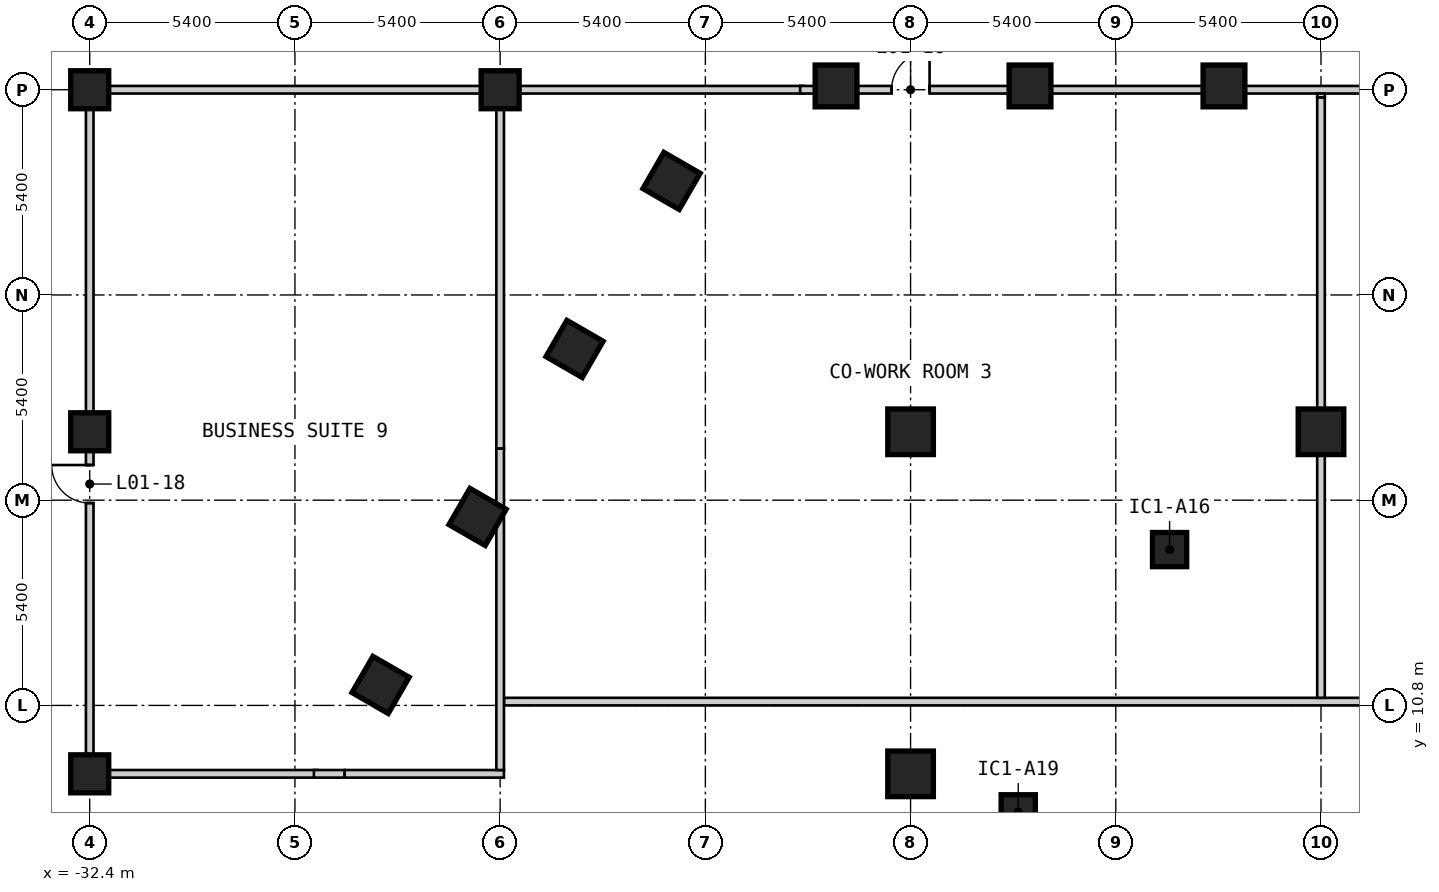
"""IFC4 building model, lengths in metres.
Left out: names, types, materials, properties, quantities, classifications, styles, units other than length and angle.
Written with IfcOpenShell. Run it as: python <this file> out.ifc"""

import sys

from ifc_helpers import new_model, si_unit, direction, frame, frame_2d, origin, origin_2d, place, context, subcontext, project, spatial, rectangle, extrude, element, fill, save


model = new_model("IFC4")
c1 = context("Model", 3, precision=1e-05, world=origin(), true_north=direction((0.0, 1.0)))
c2 = subcontext(c1, "Body", "Model", "MODEL_VIEW")
j1 = project(units=[si_unit("LENGTHUNIT", "METRE"), si_unit("PLANEANGLEUNIT", "RADIAN")], contexts=[c1])
p1 = place(None, origin())
s1 = spatial("IfcSite", under=j1, at=p1, CompositionType="ELEMENT")
p2 = place(p1, origin())
s2 = spatial("IfcBuilding", under=s1, at=p2, CompositionType="ELEMENT")
p3 = place(p2, frame((0.0, 0.0, 5.0)))
s3 = spatial("IfcBuildingStorey", under=s2, at=p3, CompositionType="ELEMENT", Elevation=5.0)
for number, where, z_axis, x_axis in (
    (1, (-2.553, 27.1, 0.0), (0.0, 0.0, 1.0), (-1.0, 0.0, 0.0)),
    (2, (-7.657, 27.1, 0.0), (0.0, 0.0, 1.0), (-1.0, 0.0, 0.0)),
    (3, (-12.761, 27.1, 0.0), (0.0, 0.0, 1.0), (-1.0, 0.0, 0.0)),
    (4, (-17.09, 24.6, 0.0), (0.0, 0.0, 1.0), (-0.5, -0.866, 0.0)),
    (5, (-19.642, 20.18, 0.0), (0.0, 0.0, 1.0), (-0.5, -0.866, 0.0)),
    (6, (-22.194, 15.759, 0.0), (0.0, 0.0, 1.0), (-0.5, -0.866, 0.0)),
    (7, (-24.746, 11.339, 0.0), (0.0, 0.0, 1.0), (-0.5, -0.866, 0.0)),
):
    element("IfcColumn", number, at=place(p3, frame(where, z_axis=z_axis, x_axis=x_axis)), inside=s3, PredefinedType="COLUMN", context=c2, shape_type="SweptSolid", body=[
        extrude(rectangle(XDim=1.1, YDim=1.1, at=origin_2d()), origin(), (0.0, 0.0, 1.0), 4.0),
    ])
for number, where, z_axis, x_axis in (
    (8, (-3.984, 14.9, 0.0), (0.0, 0.0, 1.0), (1.0, 0.0, 0.0)),
    (9, (-7.967, 8.0, 0.0), (0.0, 0.0, 1.0), (1.0, 0.0, 0.0)),
):
    element("IfcColumn", number, at=place(p3, frame(where, z_axis=z_axis, x_axis=x_axis)), inside=s3, PredefinedType="COLUMN", context=c2, shape_type="SweptSolid", body=[
        extrude(rectangle(XDim=0.9, YDim=0.9, at=origin_2d()), origin(), (0.0, 0.0, 1.0), 4.0),
    ])
for number, where, z_axis, x_axis in (
    (10, (-10.8, 9.0, 0.0), (0.0, 0.0, 1.0), (1.0, 0.0, 0.0)),
    (11, (-10.8, 18.0, 0.0), (0.0, 0.0, 1.0), (1.0, 0.0, 0.0)),
    (12, (0.0, 18.0, 0.0), (0.0, 0.0, 1.0), (1.0, 0.0, 0.0)),
):
    element("IfcColumn", number, at=place(p3, frame(where, z_axis=z_axis, x_axis=x_axis)), inside=s3, PredefinedType="COLUMN", context=c2, shape_type="SweptSolid", body=[
        extrude(rectangle(XDim=1.2, YDim=1.2, at=origin_2d()), origin(), (0.0, 0.0, 1.0), 4.0),
    ])
for number, where, z_axis, x_axis in (
    (13, (-32.4, 9.0, 0.0), (0.0, 0.0, 1.0), (1.0, 0.0, 0.0)),
    (14, (-32.4, 18.0, 0.0), (0.0, 0.0, 1.0), (1.0, 0.0, 0.0)),
    (15, (-32.4, 27.0, 0.0), (0.0, 0.0, 1.0), (1.0, 0.0, 0.0)),
    (16, (-21.6, 27.0, 0.0), (0.0, 0.0, 1.0), (1.0, 0.0, 0.0)),
):
    element("IfcColumn", number, at=place(p3, frame(where, z_axis=z_axis, x_axis=x_axis)), inside=s3, PredefinedType="COLUMN", context=c2, shape_type="SweptSolid", body=[
        extrude(rectangle(XDim=1.0, YDim=1.0, at=origin_2d()), origin(), (0.0, 0.0, 1.0), 4.0),
    ])
p4 = place(p3, frame((-32.4, 9.0, 0.0), z_axis=(0.0, 0.0, 1.0), x_axis=(1.0, 0.0, 0.0)))
e17 = element("IfcWall", 17, at=p4, inside=s3, PredefinedType="PARTITIONING", context=c2, shape_type="SweptSolid", body=[
    extrude(rectangle(XDim=5.999, YDim=0.2, at=frame_2d((3.0, 0.0))), origin(), (0.0, 0.0, 1.0), 3.5),
])
p5 = place(p3, frame((-26.501, 9.0, 0.0), z_axis=(0.0, 0.0, 1.0), x_axis=(1.0, 0.0, 0.0)))
e18 = element("IfcWall", 18, at=p5, inside=s3, PredefinedType="PARTITIONING", context=c2, shape_type="SweptSolid", body=[
    extrude(rectangle(XDim=0.809, YDim=0.2, at=frame_2d((0.405, 0.0))), origin(), (0.0, 0.0, 1.0), 2.77),
])
p6 = place(p3, frame((-25.692, 9.0, 0.0), z_axis=(0.0, 0.0, 1.0), x_axis=(1.0, 0.0, 0.0)))
e19 = element("IfcWall", 19, at=p6, inside=s3, PredefinedType="PARTITIONING", context=c2, shape_type="SweptSolid", body=[
    extrude(rectangle(XDim=4.192, YDim=0.2, at=frame_2d((2.096, 0.0))), origin(), (0.0, 0.0, 1.0), 3.5),
])
p7 = place(p3, frame((-21.5, 10.9, 0.0), z_axis=(0.0, 0.0, 1.0), x_axis=(1.0, 0.0, 0.0)))
e20 = element("IfcWall", 20, at=p7, inside=s3, PredefinedType="PARTITIONING", context=c2, shape_type="SweptSolid", body=[
    extrude(rectangle(XDim=43.0, YDim=0.2, at=frame_2d((21.5, 0.0))), origin(), (0.0, 0.0, 1.0), 3.5),
])
p8 = place(p3, frame((-32.4, 27.0, 0.0), z_axis=(0.0, 0.0, 1.0), x_axis=(1.0, 0.0, 0.0)))
e21 = element("IfcWall", 21, at=p8, inside=s3, PredefinedType="PARTITIONING", context=c2, shape_type="SweptSolid", body=[
    extrude(rectangle(XDim=18.793, YDim=0.2, at=frame_2d((9.396, 0.0))), origin(), (0.0, 0.0, 1.0), 3.5),
])
p9 = place(p3, frame((-13.707, 27.0, 0.0), z_axis=(0.0, 0.0, 1.0), x_axis=(1.0, 0.0, 0.0)))
e22 = element("IfcWall", 22, at=p9, inside=s3, PredefinedType="PARTITIONING", context=c2, shape_type="SweptSolid", body=[
    extrude(rectangle(XDim=0.946, YDim=0.2, at=frame_2d((0.473, 0.0))), origin(), (0.0, 0.0, 1.0), 2.77),
])
p10 = place(p3, frame((-12.761, 27.0, 0.0), z_axis=(0.0, 0.0, 1.0), x_axis=(1.0, 0.0, 0.0)))
e23 = element("IfcWall", 23, at=p10, inside=s3, PredefinedType="PARTITIONING", context=c2, shape_type="SweptSolid", body=[
    extrude(rectangle(XDim=0.116, YDim=0.2, at=frame_2d((0.058, 0.0))), origin(), (0.0, 0.0, 1.0), 2.77),
])
p11 = place(p3, frame((-12.645, 27.0, 0.0), z_axis=(0.0, 0.0, 1.0), x_axis=(1.0, 0.0, 0.0)))
e24 = element("IfcWall", 24, at=p11, inside=s3, PredefinedType="PARTITIONING", context=c2, shape_type="SweptSolid", body=[
    extrude(rectangle(XDim=4.988, YDim=0.2, at=frame_2d((2.494, 0.0))), origin(), (0.0, 0.0, 1.0), 2.77),
])
p12 = place(p11, frame((2.345, 0.0, 0.0), z_axis=(0.0, 0.0, 1.0), x_axis=(-1.0, 0.0, 0.0)))
e25 = element("IfcOpeningElement", 25, at=p12, cuts=e24, PredefinedType="OPENING", context=c2, shape_type="SweptSolid", body=[
    extrude(rectangle(XDim=1.0, YDim=2.1, at=frame_2d((0.5, 1.05))), frame((0.0, 0.11, 0.0), z_axis=(0.0, -1.0, 0.0), x_axis=(1.0, 0.0, 0.0)), (0.0, 0.0, 1.0), 0.22),
])
for number, where, z_axis, x_axis in (
    (26, (-7.657, 27.0, 0.0), (0.0, 0.0, 1.0), (1.0, 0.0, 0.0)),
    (27, (-2.553, 27.0, 0.0), (0.0, 0.0, 1.0), (1.0, 0.0, 0.0)),
):
    element("IfcWall", number, at=place(p3, frame(where, z_axis=z_axis, x_axis=x_axis)), inside=s3, PredefinedType="PARTITIONING", context=c2, shape_type="SweptSolid", body=[
        extrude(rectangle(XDim=5.104, YDim=0.2, at=frame_2d((2.552, 0.0))), origin(), (0.0, 0.0, 1.0), 2.77),
    ])
p13 = place(p3, frame((-32.4, 9.1, 0.0), z_axis=(0.0, 0.0, 1.0), x_axis=(0.0, 1.0, 0.0)))
e28 = element("IfcWall", 28, at=p13, inside=s3, PredefinedType="PARTITIONING", context=c2, shape_type="SweptSolid", body=[
    extrude(rectangle(XDim=17.8, YDim=0.2, at=frame_2d((8.9, 0.0))), origin(), (0.0, 0.0, 1.0), 3.5),
])
p14 = place(p13, frame((8.025, 0.0, 0.0), z_axis=(0.0, 0.0, 1.0), x_axis=(-1.0, 0.0, 0.0)))
e29 = element("IfcOpeningElement", 29, at=p14, cuts=e28, PredefinedType="OPENING", context=c2, shape_type="SweptSolid", body=[
    extrude(rectangle(XDim=1.0, YDim=2.1, at=frame_2d((0.5, 1.05))), frame((0.0, 0.11, 0.0), z_axis=(0.0, -1.0, 0.0), x_axis=(1.0, 0.0, 0.0)), (0.0, 0.0, 1.0), 0.22),
])
p15 = place(p3, frame((-21.6, 9.1, 0.0), z_axis=(0.0, 0.0, 1.0), x_axis=(0.0, 1.0, 0.0)))
e30 = element("IfcWall", 30, at=p15, inside=s3, PredefinedType="PARTITIONING", context=c2, shape_type="SweptSolid", body=[
    extrude(rectangle(XDim=6.915, YDim=0.2, at=frame_2d((3.458, 0.0))), origin(), (0.0, 0.0, 1.0), 3.5),
])
p16 = place(p3, frame((-21.6, 16.015, 0.0), z_axis=(0.0, 0.0, 1.0), x_axis=(0.0, 1.0, 0.0)))
e31 = element("IfcWall", 31, at=p16, inside=s3, PredefinedType="PARTITIONING", context=c2, shape_type="SweptSolid", body=[
    extrude(rectangle(XDim=1.546, YDim=0.2, at=frame_2d((0.773, 0.0))), origin(), (0.0, 0.0, 1.0), 2.77),
])
p17 = place(p3, frame((-21.6, 17.561, 0.0), z_axis=(0.0, 0.0, 1.0), x_axis=(0.0, 1.0, 0.0)))
e32 = element("IfcWall", 32, at=p17, inside=s3, PredefinedType="PARTITIONING", context=c2, shape_type="SweptSolid", body=[
    extrude(rectangle(XDim=9.339, YDim=0.2, at=frame_2d((4.669, 0.0))), origin(), (0.0, 0.0, 1.0), 3.5),
])
p18 = place(p3, frame((0.0, 11.0, 0.0), z_axis=(0.0, 0.0, 1.0), x_axis=(0.0, 1.0, 0.0)))
e33 = element("IfcWall", 33, at=p18, inside=s3, PredefinedType="PARTITIONING", context=c2, shape_type="SweptSolid", body=[
    extrude(rectangle(XDim=15.8, YDim=0.2, at=frame_2d((7.9, 0.0))), origin(), (0.0, 0.0, 1.0), 3.5),
])
p19 = place(p3, frame((0.0, 26.8, 0.0), z_axis=(0.0, 0.0, 1.0), x_axis=(0.0, 1.0, 0.0)))
e34 = element("IfcWall", 34, at=p19, inside=s3, PredefinedType="PARTITIONING", context=c2, shape_type="SweptSolid", body=[
    extrude(rectangle(XDim=0.1, YDim=0.2, at=frame_2d((0.05, 0.0))), origin(), (0.0, 0.0, 1.0), 2.77),
])
p20 = place(p12, origin())
e35 = element("IfcDoor", 35, at=p20, inside=s3, OperationType="SINGLE_SWING_LEFT", PredefinedType="DOOR", context=c2, shape_type="SweptSolid", body=[
    extrude(rectangle(XDim=1.0, YDim=2.1, at=frame_2d((0.5, 1.05))), frame((0.0, 0.025, 0.0), z_axis=(0.0, -1.0, 0.0), x_axis=(1.0, 0.0, 0.0)), (0.0, 0.0, 1.0), 0.05),
])
fill(e25, e35)
p21 = place(p14, origin())
e36 = element("IfcDoor", 36, at=p21, inside=s3, OperationType="SINGLE_SWING_LEFT", PredefinedType="DOOR", context=c2, shape_type="SweptSolid", body=[
    extrude(rectangle(XDim=1.0, YDim=2.1, at=frame_2d((0.5, 1.05))), frame((0.0, 0.025, 0.0), z_axis=(0.0, -1.0, 0.0), x_axis=(1.0, 0.0, 0.0)), (0.0, 0.0, 1.0), 0.05),
])
fill(e29, e36)
save(model, sys.argv[1])
